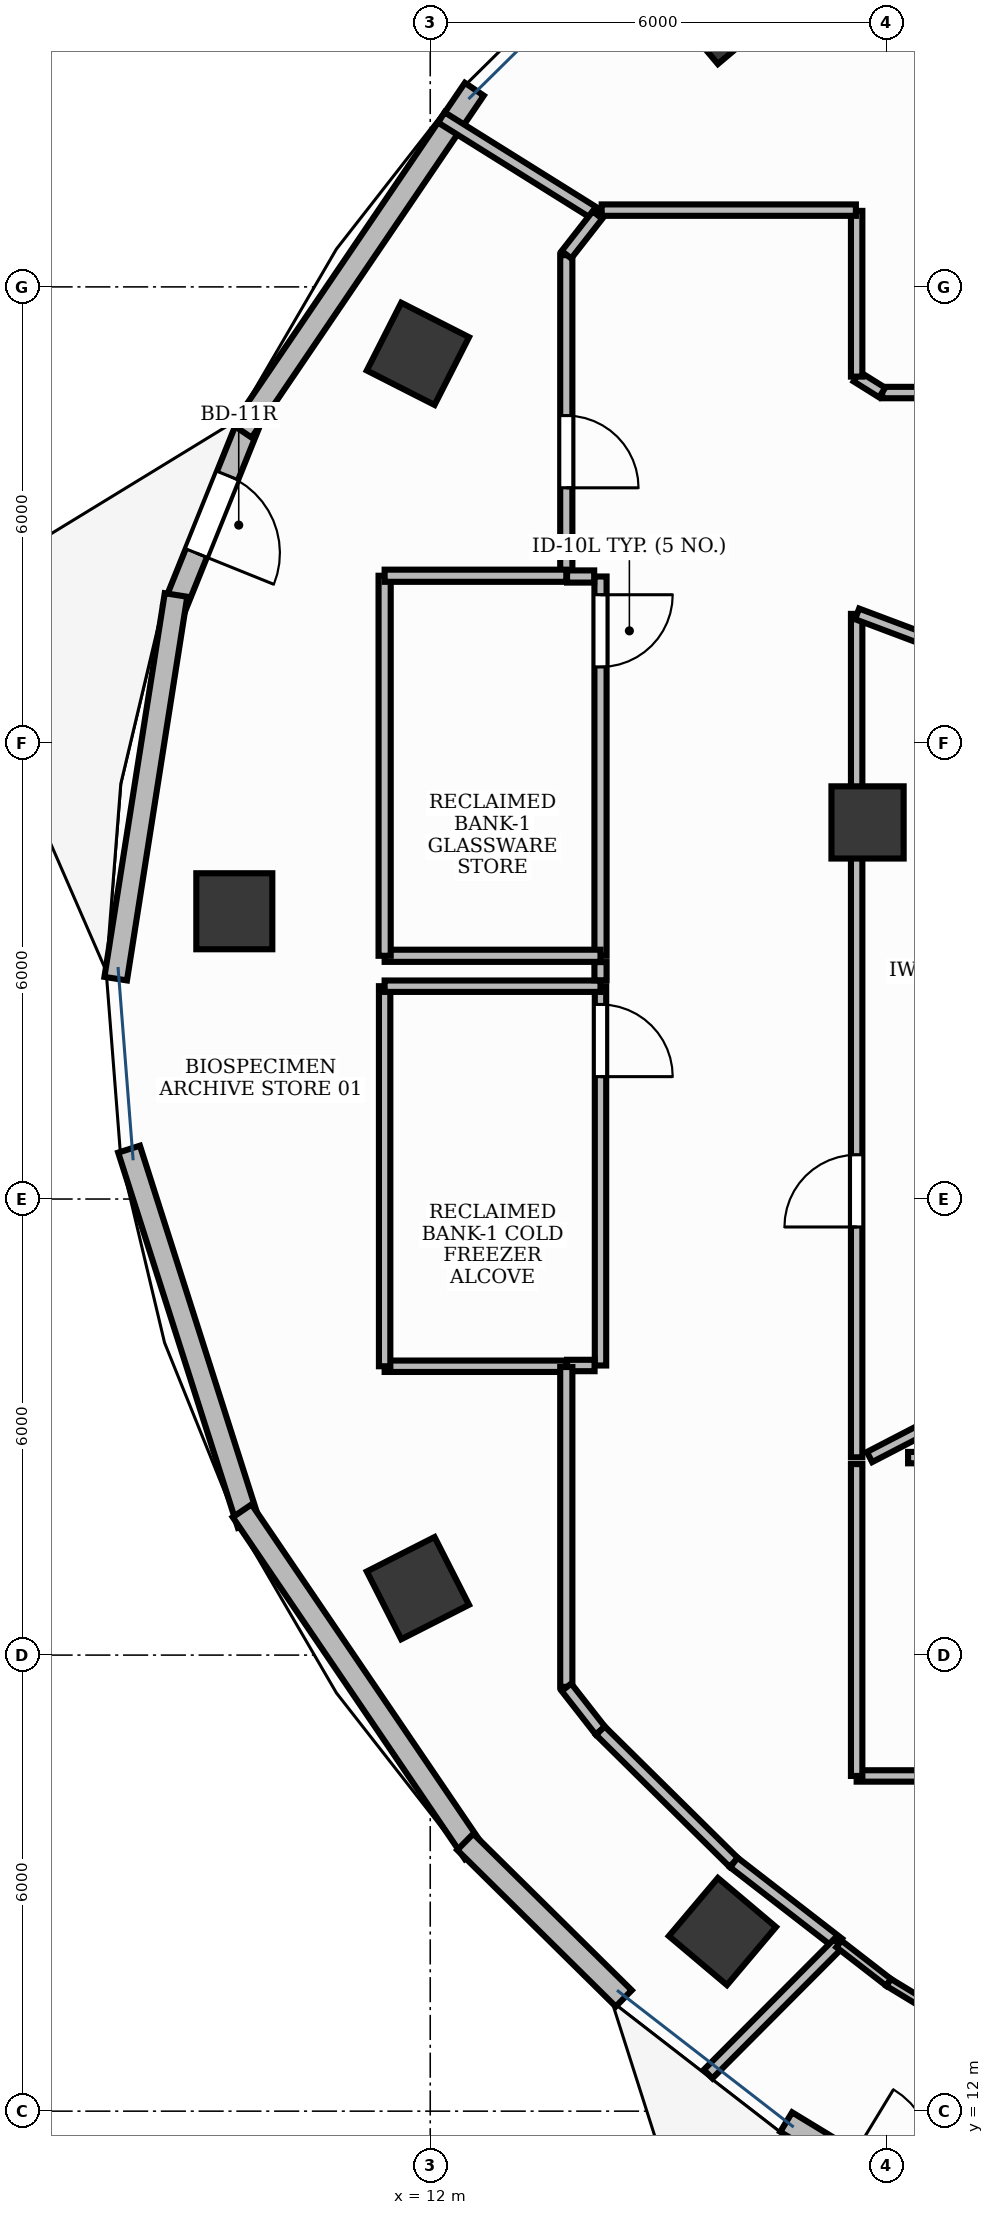
"""IFC4 building model, lengths in metres.
Left out: names, types, materials, properties, quantities, classifications, styles, units other than length and angle.
Written with IfcOpenShell. Run it as: python <this file> out.ifc"""

import sys

from ifc_helpers import new_model, si_unit, direction, frame, frame_2d, origin, origin_2d, place, context, subcontext, project, spatial, rectangle, extrude, element, fill, save


model = new_model("IFC4")
c1 = context("Model", 3, precision=1e-05, world=origin(), true_north=direction((0.0, 1.0)))
c2 = subcontext(c1, "Body", "Model", "MODEL_VIEW")
j1 = project(units=[si_unit("LENGTHUNIT", "METRE"), si_unit("PLANEANGLEUNIT", "RADIAN")], contexts=[c1])
p1 = place(None, origin())
s1 = spatial("IfcSite", under=j1, at=p1, CompositionType="ELEMENT")
p2 = place(p1, origin())
s2 = spatial("IfcBuilding", under=s1, at=p2, CompositionType="ELEMENT")
p3 = place(p2, frame((0.0, 0.0, 187.8)))
s3 = spatial("IfcBuildingStorey", under=s2, at=p3, CompositionType="ELEMENT", Elevation=187.8)
for number, where, z_axis, x_axis in (
    (1, (15.844, 39.637, -0.0), (0.0, 0.0, 1.0), (0.764, 0.645, 0.0)),
    (2, (11.838, 35.119, -0.0), (0.0, 0.0, 1.0), (0.453, 0.891, 0.0)),
    (3, (9.423, 27.786, -0.0), (0.0, 0.0, 1.0), (0.0, 1.0, 0.0)),
):
    element("IfcColumn", number, at=place(p3, frame(where, z_axis=z_axis, x_axis=x_axis)), inside=s3, PredefinedType="COLUMN", context=c2, shape_type="SweptSolid", body=[
        extrude(rectangle(XDim=1.0, YDim=1.0, at=origin_2d()), origin(), (0.0, 0.0, 1.0), 3.901),
    ])
p4 = place(p3, frame((17.753, 28.955, -0.0), z_axis=(0.0, 0.0, 1.0), x_axis=(1.0, 0.0, 0.0)))
e4 = element("IfcColumn", 4, at=p4, inside=s3, PredefinedType="COLUMN", context=c2, shape_type="SweptSolid", body=[
    extrude(rectangle(XDim=0.95, YDim=0.95, at=origin_2d()), origin(), (0.0, 0.0, 1.0), 3.901),
])
for number, where, z_axis, x_axis in (
    (5, (11.838, 18.881, -0.0), (0.0, 0.0, 1.0), (-0.453, 0.891, 0.0)),
    (6, (15.844, 14.363, -0.0), (0.0, 0.0, 1.0), (-0.764, 0.645, 0.0)),
):
    element("IfcColumn", number, at=place(p3, frame(where, z_axis=z_axis, x_axis=x_axis)), inside=s3, PredefinedType="COLUMN", context=c2, shape_type="SweptSolid", body=[
        extrude(rectangle(XDim=1.0, YDim=1.0, at=origin_2d()), origin(), (0.0, 0.0, 1.0), 3.901),
    ])
p5 = place(p3, frame((9.626, 34.242, 0.0), z_axis=(0.0, 0.0, 1.0), x_axis=(-0.373983610438, -0.927435312636, 0.0)))
e7 = element("IfcWall", 7, at=p5, inside=s3, PredefinedType="STANDARD", context=c2, shape_type="SweptSolid", body=[
    extrude(rectangle(XDim=2.661, YDim=0.3, at=frame_2d((1.331, 0.0))), origin(), (0.0, 0.0, 1.0), 3.9),
])
p6 = place(p5, frame((0.781, 0.0, 0.0)))
e8 = element("IfcOpeningElement", 8, at=p6, cuts=e7, PredefinedType="OPENING", context=c2, shape_type="SweptSolid", body=[
    extrude(rectangle(XDim=1.1, YDim=2.15, at=frame_2d((0.55, 1.075))), frame((0.0, 0.165, 0.0), z_axis=(0.0, -1.0, 0.0), x_axis=(1.0, 0.0, 0.0)), (0.0, 0.0, 1.0), 0.33),
])
p7 = place(p3, frame((16.683, 11.856, 0.0), z_axis=(0.0, 0.0, 1.0), x_axis=(0.85455658592, -0.519358297769, 0.0)))
e9 = element("IfcWall", 9, at=p7, inside=s3, PredefinedType="STANDARD", context=c2, shape_type="SweptSolid", body=[
    extrude(rectangle(XDim=3.066, YDim=0.3, at=frame_2d((1.533, 0.0))), origin(), (0.0, 0.0, 1.0), 3.9),
])
p8 = place(p7, frame((0.983, 0.0, 0.0)))
e10 = element("IfcOpeningElement", 10, at=p8, cuts=e9, PredefinedType="OPENING", context=c2, shape_type="SweptSolid", body=[
    extrude(rectangle(XDim=1.1, YDim=2.15, at=frame_2d((0.55, 1.075))), frame((0.0, 0.165, 0.0), z_axis=(0.0, -1.0, 0.0), x_axis=(1.0, 0.0, 0.0)), (0.0, 0.0, 1.0), 0.33),
])
p9 = place(p3, frame((12.58, 38.601, 0.0), z_axis=(0.0, 0.0, 1.0), x_axis=(-0.561663900064, -0.827365495634, 0.0)))
e11 = element("IfcWall", 11, at=p9, inside=s3, PredefinedType="STANDARD", context=c2, shape_type="SweptSolid", body=[
    extrude(rectangle(XDim=5.438, YDim=0.3, at=frame_2d((2.719, 0.0))), origin(), (0.0, 0.0, 1.0), 3.9),
])
p10 = place(p3, frame((8.655, 31.947, 0.0), z_axis=(0.0, 0.0, 1.0), x_axis=(-0.155280464429, -0.987870425393, 0.0)))
e12 = element("IfcWall", 12, at=p10, inside=s3, PredefinedType="STANDARD", context=c2, shape_type="SweptSolid", body=[
    extrude(rectangle(XDim=5.11, YDim=0.3, at=frame_2d((2.555, 0.0))), origin(), (0.0, 0.0, 1.0), 3.9),
])
p11 = place(p3, frame((8.038, 24.656, 0.0), z_axis=(0.0, 0.0, 1.0), x_axis=(0.303930984078, -0.952694052106, 0.0)))
e13 = element("IfcWall", 13, at=p11, inside=s3, PredefinedType="STANDARD", context=c2, shape_type="SweptSolid", body=[
    extrude(rectangle(XDim=5.181, YDim=0.3, at=frame_2d((2.591, 0.0))), origin(), (0.0, 0.0, 1.0), 3.47),
])
p12 = place(p3, frame((9.526, 19.898, 0.0), z_axis=(0.0, 0.0, 1.0), x_axis=(0.561663900064, -0.827365495634, 0.0)))
e14 = element("IfcWall", 14, at=p12, inside=s3, PredefinedType="STANDARD", context=c2, shape_type="SweptSolid", body=[
    extrude(rectangle(XDim=5.438, YDim=0.3, at=frame_2d((2.719, 0.0))), origin(), (0.0, 0.0, 1.0), 3.47),
])
p13 = place(p3, frame((12.461, 15.543, 0.0), z_axis=(0.0, 0.0, 1.0), x_axis=(0.711508162911, -0.702677830951, 0.0)))
e15 = element("IfcWall", 15, at=p13, inside=s3, PredefinedType="STANDARD", context=c2, shape_type="SweptSolid", body=[
    extrude(rectangle(XDim=2.931, YDim=0.3, at=frame_2d((1.465, 0.0))), origin(), (0.0, 0.0, 1.0), 3.9),
])
p14 = place(p3, frame((14.24, 26.8, 0.0), z_axis=(0.0, 0.0, 1.0), x_axis=(0.0, -1.0, 0.0)))
e16 = element("IfcWall", 16, at=p14, inside=s3, PredefinedType="PARTITIONING", context=c2, shape_type="SweptSolid", body=[
    extrude(rectangle(XDim=4.99, YDim=0.15, at=frame_2d((2.495, 0.0))), origin(), (0.0, 0.0, 1.0), 2.91),
])
p15 = place(p14, frame((0.24, 0.0, 0.0)))
e17 = element("IfcOpeningElement", 17, at=p15, cuts=e16, PredefinedType="OPENING", context=c2, shape_type="SweptSolid", body=[
    extrude(rectangle(XDim=0.95, YDim=2.15, at=frame_2d((0.475, 1.075))), frame((0.0, 0.09, 0.0), z_axis=(0.0, -1.0, 0.0), x_axis=(1.0, 0.0, 0.0)), (0.0, 0.0, 1.0), 0.18),
])
p16 = place(p3, frame((14.24, 32.19, 0.0), z_axis=(0.0, 0.0, 1.0), x_axis=(0.0, -1.0, 0.0)))
e18 = element("IfcWall", 18, at=p16, inside=s3, PredefinedType="PARTITIONING", context=c2, shape_type="SweptSolid", body=[
    extrude(rectangle(XDim=4.99, YDim=0.16, at=frame_2d((2.495, 0.0))), origin(), (0.0, 0.0, 1.0), 2.91),
])
p17 = place(p16, frame((0.24, 0.0, 0.0)))
e19 = element("IfcOpeningElement", 19, at=p17, cuts=e18, PredefinedType="OPENING", context=c2, shape_type="SweptSolid", body=[
    extrude(rectangle(XDim=0.95, YDim=2.15, at=frame_2d((0.475, 1.075))), frame((0.0, 0.095, 0.0), z_axis=(0.0, -1.0, 0.0), x_axis=(1.0, 0.0, 0.0)), (0.0, 0.0, 1.0), 0.19),
])
p18 = place(p3, frame((13.79, 36.417, 0.0), z_axis=(0.0, 0.0, 1.0), x_axis=(0.0, -1.0, 0.0)))
e20 = element("IfcWall", 20, at=p18, inside=s3, PredefinedType="PARTITIONING", context=c2, shape_type="SweptSolid", body=[
    extrude(rectangle(XDim=4.208, YDim=0.16, at=frame_2d((2.104, 0.0))), origin(), (0.0, 0.0, 1.0), 2.91),
])
p19 = place(p18, frame((2.111, 0.0, 0.0)))
e21 = element("IfcOpeningElement", 21, at=p19, cuts=e20, PredefinedType="OPENING", context=c2, shape_type="SweptSolid", body=[
    extrude(rectangle(XDim=0.95, YDim=2.15, at=frame_2d((0.475, 1.075))), frame((0.0, 0.095, 0.0), z_axis=(0.0, -1.0, 0.0), x_axis=(1.0, 0.0, 0.0)), (0.0, 0.0, 1.0), 0.19),
])
p20 = place(p3, frame((17.61, 20.602, 0.0), z_axis=(0.0, 0.0, 1.0), x_axis=(0.0, 1.0, 0.0)))
e22 = element("IfcWall", 22, at=p20, inside=s3, PredefinedType="PARTITIONING", context=c2, shape_type="SweptSolid", body=[
    extrude(rectangle(XDim=11.096, YDim=0.15, at=frame_2d((5.548, 0.0))), origin(), (0.0, 0.0, 1.0), 2.91),
])
p21 = place(p20, frame((3.03, 0.0, 0.0)))
e23 = element("IfcOpeningElement", 23, at=p21, cuts=e22, PredefinedType="OPENING", context=c2, shape_type="SweptSolid", body=[
    extrude(rectangle(XDim=0.95, YDim=2.15, at=frame_2d((0.475, 1.075))), frame((0.0, 0.09, 0.0), z_axis=(0.0, -1.0, 0.0), x_axis=(1.0, 0.0, 0.0)), (0.0, 0.0, 1.0), 0.18),
])
p22 = place(p3, frame((14.162, 21.81, 0.0), z_axis=(0.0, 0.0, 1.0), x_axis=(-1.0, 0.0, 0.0)))
e24 = element("IfcWall", 24, at=p22, inside=s3, PredefinedType="PARTITIONING", context=c2, shape_type="SweptSolid", body=[
    extrude(rectangle(XDim=0.362, YDim=0.15, at=frame_2d((0.181, 0.0))), origin(), (0.0, 0.0, 1.0), 2.91),
])
p23 = place(p3, frame((13.79, 21.8, 0.0), z_axis=(0.0, 0.0, 1.0), x_axis=(-1.0, 0.0, 0.0)))
e25 = element("IfcWall", 25, at=p23, inside=s3, PredefinedType="PARTITIONING", context=c2, shape_type="SweptSolid", body=[
    extrude(rectangle(XDim=2.39, YDim=0.15, at=frame_2d((1.195, 0.0))), origin(), (0.0, 0.0, 1.0), 2.91),
])
p24 = place(p3, frame((11.4, 21.8, 0.0), z_axis=(0.0, 0.0, 1.0), x_axis=(0.0, 1.0, 0.0)))
e26 = element("IfcWall", 26, at=p24, inside=s3, PredefinedType="PARTITIONING", context=c2, shape_type="SweptSolid", body=[
    extrude(rectangle(XDim=5.0, YDim=0.15, at=frame_2d((2.5, 0.0))), origin(), (0.0, 0.0, 1.0), 2.91),
])
p25 = place(p3, frame((11.4, 26.8, 0.0), z_axis=(0.0, 0.0, 1.0), x_axis=(1.0, 0.0, 0.0)))
e27 = element("IfcWall", 27, at=p25, inside=s3, PredefinedType="PARTITIONING", context=c2, shape_type="SweptSolid", body=[
    extrude(rectangle(XDim=2.84, YDim=0.15, at=frame_2d((1.42, 0.0))), origin(), (0.0, 0.0, 1.0), 2.91),
])
p26 = place(p3, frame((13.8, 32.19, 0.0), z_axis=(0.0, 0.0, 1.0), x_axis=(1.0, 0.0, 0.0)))
e28 = element("IfcWall", 28, at=p26, inside=s3, PredefinedType="PARTITIONING", context=c2, shape_type="SweptSolid", body=[
    extrude(rectangle(XDim=0.357, YDim=0.16, at=frame_2d((0.178, 0.0))), origin(), (0.0, 0.0, 1.0), 2.91),
])
p27 = place(p3, frame((14.24, 27.2, 0.0), z_axis=(0.0, 0.0, 1.0), x_axis=(-1.0, 0.0, 0.0)))
e29 = element("IfcWall", 29, at=p27, inside=s3, PredefinedType="PARTITIONING", context=c2, shape_type="SweptSolid", body=[
    extrude(rectangle(XDim=2.84, YDim=0.16, at=frame_2d((1.42, 0.0))), origin(), (0.0, 0.0, 1.0), 2.91),
])
p28 = place(p3, frame((11.4, 27.2, 0.0), z_axis=(0.0, 0.0, 1.0), x_axis=(0.0, 1.0, 0.0)))
e30 = element("IfcWall", 30, at=p28, inside=s3, PredefinedType="PARTITIONING", context=c2, shape_type="SweptSolid", body=[
    extrude(rectangle(XDim=5.0, YDim=0.16, at=frame_2d((2.5, 0.0))), origin(), (0.0, 0.0, 1.0), 2.91),
])
p29 = place(p3, frame((11.4, 32.2, 0.0), z_axis=(0.0, 0.0, 1.0), x_axis=(1.0, 0.0, 0.0)))
e31 = element("IfcWall", 31, at=p29, inside=s3, PredefinedType="PARTITIONING", context=c2, shape_type="SweptSolid", body=[
    extrude(rectangle(XDim=2.39, YDim=0.16, at=frame_2d((1.195, 0.0))), origin(), (0.0, 0.0, 1.0), 2.91),
])
p30 = place(p3, frame((12.146, 38.229, 0.0), z_axis=(0.0, 0.0, 1.0), x_axis=(0.848066263041, -0.529890190031, 0.0)))
e32 = element("IfcWall", 32, at=p30, inside=s3, PredefinedType="PARTITIONING", context=c2, shape_type="SweptSolid", body=[
    extrude(rectangle(XDim=2.422, YDim=0.16, at=frame_2d((1.211, 0.0))), origin(), (0.0, 0.0, 1.0), 2.91),
])
p31 = place(p3, frame((14.2, 36.946, 0.0), z_axis=(0.0, 0.0, 1.0), x_axis=(-0.615851305214, -0.787862405415, 0.0)))
e33 = element("IfcWall", 33, at=p31, inside=s3, PredefinedType="PARTITIONING", context=c2, shape_type="SweptSolid", body=[
    extrude(rectangle(XDim=0.663, YDim=0.16, at=frame_2d((0.332, 0.0))), origin(), (0.0, 0.0, 1.0), 2.91),
])
p32 = place(p3, frame((14.24, 27.117, 0.0), z_axis=(0.0, 0.0, 1.0), x_axis=(0.0, -1.0, 0.0)))
e34 = element("IfcWall", 34, at=p32, inside=s3, PredefinedType="PARTITIONING", context=c2, shape_type="SweptSolid", body=[
    extrude(rectangle(XDim=0.239, YDim=0.16, at=frame_2d((0.12, 0.0))), origin(), (0.0, 0.0, 1.0), 2.91),
])
p33 = place(p3, frame((13.79, 21.79, 0.0), z_axis=(0.0, 0.0, 1.0), x_axis=(0.0, -1.0, 0.0)))
e35 = element("IfcWall", 35, at=p33, inside=s3, PredefinedType="PARTITIONING", context=c2, shape_type="SweptSolid", body=[
    extrude(rectangle(XDim=4.208, YDim=0.16, at=frame_2d((2.104, 0.0))), origin(), (0.0, 0.0, 1.0), 2.91),
])
p34 = place(p3, frame((13.792, 17.576, 0.0), z_axis=(0.0, 0.0, 1.0), x_axis=(0.615925776879, -0.787804187204, 0.0)))
e36 = element("IfcWall", 36, at=p34, inside=s3, PredefinedType="PARTITIONING", context=c2, shape_type="SweptSolid", body=[
    extrude(rectangle(XDim=0.723, YDim=0.16, at=frame_2d((0.361, 0.0))), origin(), (0.0, 0.0, 1.0), 2.91),
])
p35 = place(p3, frame((14.238, 17.006, 0.0), z_axis=(0.0, 0.0, 1.0), x_axis=(0.711447157113, -0.702739598027, 0.0)))
e37 = element("IfcWall", 37, at=p35, inside=s3, PredefinedType="PARTITIONING", context=c2, shape_type="SweptSolid", body=[
    extrude(rectangle(XDim=2.467, YDim=0.16, at=frame_2d((1.234, 0.0))), origin(), (0.0, 0.0, 1.0), 2.91),
])
p36 = place(p3, frame((15.995, 15.271, 0.0), z_axis=(0.0, 0.0, 1.0), x_axis=(0.790583329936, -0.612354471224, 0.0)))
e38 = element("IfcWall", 38, at=p36, inside=s3, PredefinedType="PARTITIONING", context=c2, shape_type="SweptSolid", body=[
    extrude(rectangle(XDim=1.738, YDim=0.16, at=frame_2d((0.869, 0.0))), origin(), (0.0, 0.0, 1.0), 2.91),
])
p37 = place(p3, frame((17.369, 14.207, 0.0), z_axis=(0.0, 0.0, 1.0), x_axis=(-0.705948871301, -0.708262798056, 0.0)))
e39 = element("IfcWall", 39, at=p37, inside=s3, PredefinedType="PARTITIONING", context=c2, shape_type="SweptSolid", body=[
    extrude(rectangle(XDim=2.427, YDim=0.16, at=frame_2d((1.213, 0.0))), origin(), (0.0, 0.0, 1.0), 2.91),
])
p38 = place(p3, frame((17.616, 31.698, 0.0), z_axis=(0.0, 0.0, 1.0), x_axis=(0.936061955156, -0.351835211583, 0.0)))
e40 = element("IfcWall", 40, at=p38, inside=s3, PredefinedType="PARTITIONING", context=c2, shape_type="SweptSolid", body=[
    extrude(rectangle(XDim=1.842, YDim=0.15, at=frame_2d((0.921, 0.0))), origin(), (0.0, 0.0, 1.0), 2.91),
])
p39 = place(p3, frame((19.39, 21.44, 0.0), z_axis=(0.0, 0.0, 1.0), x_axis=(-0.887870664605, -0.460093124197, 0.0)))
e41 = element("IfcWall", 41, at=p39, inside=s3, PredefinedType="PARTITIONING", context=c2, shape_type="SweptSolid", body=[
    extrude(rectangle(XDim=1.813, YDim=0.15, at=frame_2d((0.907, 0.0))), origin(), (0.0, 0.0, 1.0), 2.91),
])
p40 = place(p3, frame((18.287, 20.598, 0.0), z_axis=(0.0, 0.0, 1.0), x_axis=(1.0, 0.0, 0.0)))
e42 = element("IfcWall", 42, at=p40, inside=s3, PredefinedType="PARTITIONING", context=c2, shape_type="SweptSolid", body=[
    extrude(rectangle(XDim=3.503, YDim=0.15, at=frame_2d((1.751, 0.0))), origin(), (0.0, 0.0, 1.0), 2.91),
])
p41 = place(p3, frame((19.564, 16.41, 0.0), z_axis=(0.0, 0.0, 1.0), x_axis=(-1.0, 0.0, 0.0)))
e43 = element("IfcWall", 43, at=p41, inside=s3, PredefinedType="PARTITIONING", context=c2, shape_type="SweptSolid", body=[
    extrude(rectangle(XDim=1.954, YDim=0.15, at=frame_2d((0.977, 0.0))), origin(), (0.0, 0.0, 1.0), 2.91),
])
p42 = place(p3, frame((17.61, 16.41, 0.0), z_axis=(0.0, 0.0, 1.0), x_axis=(0.0, 1.0, 0.0)))
e44 = element("IfcWall", 44, at=p42, inside=s3, PredefinedType="PARTITIONING", context=c2, shape_type="SweptSolid", body=[
    extrude(rectangle(XDim=4.103, YDim=0.15, at=frame_2d((2.052, 0.0))), origin(), (0.0, 0.0, 1.0), 2.91),
])
p43 = place(p3, frame((17.377, 14.2, 0.0), z_axis=(0.0, 0.0, 1.0), x_axis=(0.790511553124, -0.612447127822, 0.0)))
e45 = element("IfcWall", 45, at=p43, inside=s3, PredefinedType="MOVABLE", context=c2, shape_type="SweptSolid", body=[
    extrude(rectangle(XDim=0.827, YDim=0.11, at=frame_2d((0.413, 0.0))), origin(), (0.0, 0.0, 1.0), 2.91),
])
p44 = place(p3, frame((18.031, 13.694, 0.0), z_axis=(0.0, 0.0, 1.0), x_axis=(0.85454497186, -0.51937740716, 0.0)))
e46 = element("IfcWall", 46, at=p44, inside=s3, PredefinedType="MOVABLE", context=c2, shape_type="SweptSolid", body=[
    extrude(rectangle(XDim=2.122, YDim=0.11, at=frame_2d((1.061, 0.0))), origin(), (0.0, 0.0, 1.0), 2.91),
])
p45 = place(p3, frame((21.79, 34.61, 0.0), z_axis=(0.0, 0.0, 1.0), x_axis=(-1.0, 0.0, 0.0)))
e47 = element("IfcWall", 47, at=p45, inside=s3, PredefinedType="PARTITIONING", context=c2, shape_type="SweptSolid", body=[
    extrude(rectangle(XDim=3.844, YDim=0.15, at=frame_2d((1.922, 0.0))), origin(), (0.0, 0.0, 1.0), 2.91),
])
p46 = place(p3, frame((17.946, 34.61, 0.0), z_axis=(0.0, 0.0, 1.0), x_axis=(-0.84820632616, 0.529665959131, 0.0)))
e48 = element("IfcWall", 48, at=p46, inside=s3, PredefinedType="PARTITIONING", context=c2, shape_type="SweptSolid", body=[
    extrude(rectangle(XDim=0.396, YDim=0.15, at=frame_2d((0.198, 0.0))), origin(), (0.0, 0.0, 1.0), 2.91),
])
p47 = place(p3, frame((17.61, 34.82, 0.0), z_axis=(0.0, 0.0, 1.0), x_axis=(0.0, 1.0, 0.0)))
e49 = element("IfcWall", 49, at=p47, inside=s3, PredefinedType="PARTITIONING", context=c2, shape_type="SweptSolid", body=[
    extrude(rectangle(XDim=2.18, YDim=0.15, at=frame_2d((1.09, 0.0))), origin(), (0.0, 0.0, 1.0), 2.91),
])
p48 = place(p3, frame((17.6, 37.01, 0.0), z_axis=(0.0, 0.0, 1.0), x_axis=(-1.0, 0.0, 0.0)))
e50 = element("IfcWall", 50, at=p48, inside=s3, PredefinedType="PARTITIONING", context=c2, shape_type="SweptSolid", body=[
    extrude(rectangle(XDim=3.345, YDim=0.15, at=frame_2d((1.672, 0.0))), origin(), (0.0, 0.0, 1.0), 2.91),
])
p49 = place(p6, origin())
e51 = element("IfcDoor", 51, at=p49, inside=s3, OperationType="SINGLE_SWING_RIGHT", PredefinedType="DOOR", context=c2, shape_type="SweptSolid", body=[
    extrude(rectangle(XDim=1.1, YDim=2.15, at=frame_2d((0.55, 1.075))), frame((0.0, 0.025, 0.0), z_axis=(0.0, -1.0, 0.0), x_axis=(1.0, 0.0, 0.0)), (0.0, 0.0, 1.0), 0.05),
])
fill(e8, e51)
p50 = place(p15, origin())
e52 = element("IfcDoor", 52, at=p50, inside=s3, OperationType="SINGLE_SWING_RIGHT", PredefinedType="DOOR", context=c2, shape_type="SweptSolid", body=[
    extrude(rectangle(XDim=0.95, YDim=2.15, at=frame_2d((0.475, 1.075))), frame((0.0, 0.025, 0.0), z_axis=(0.0, -1.0, 0.0), x_axis=(1.0, 0.0, 0.0)), (0.0, 0.0, 1.0), 0.05),
])
fill(e17, e52)
p51 = place(p17, origin())
e53 = element("IfcDoor", 53, at=p51, inside=s3, OperationType="SINGLE_SWING_LEFT", PredefinedType="DOOR", context=c2, shape_type="SweptSolid", body=[
    extrude(rectangle(XDim=0.95, YDim=2.15, at=frame_2d((0.475, 1.075))), frame((0.0, 0.025, 0.0), z_axis=(0.0, -1.0, 0.0), x_axis=(1.0, 0.0, 0.0)), (0.0, 0.0, 1.0), 0.05),
])
fill(e19, e53)
p52 = place(p19, origin())
e54 = element("IfcDoor", 54, at=p52, inside=s3, OperationType="SINGLE_SWING_RIGHT", PredefinedType="DOOR", context=c2, shape_type="SweptSolid", body=[
    extrude(rectangle(XDim=0.95, YDim=2.15, at=frame_2d((0.475, 1.075))), frame((0.0, 0.025, 0.0), z_axis=(0.0, -1.0, 0.0), x_axis=(1.0, 0.0, 0.0)), (0.0, 0.0, 1.0), 0.05),
])
fill(e21, e54)
p53 = place(p21, origin())
e55 = element("IfcDoor", 55, at=p53, inside=s3, OperationType="SINGLE_SWING_LEFT", PredefinedType="DOOR", context=c2, shape_type="SweptSolid", body=[
    extrude(rectangle(XDim=0.95, YDim=2.15, at=frame_2d((0.475, 1.075))), frame((0.0, 0.025, 0.0), z_axis=(0.0, -1.0, 0.0), x_axis=(1.0, 0.0, 0.0)), (0.0, 0.0, 1.0), 0.05),
])
fill(e23, e55)
save(model, sys.argv[1])
